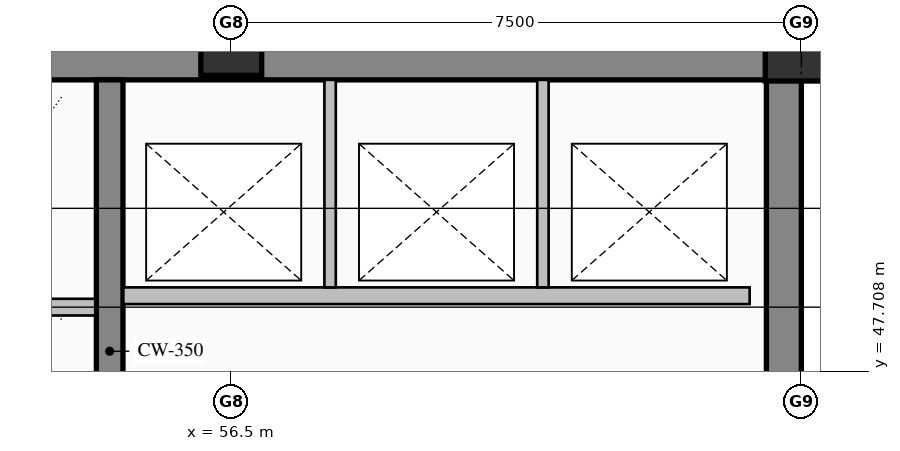
"""IFC4 building model, lengths in metres.
Left out: names, types, materials, properties, quantities, classifications, styles, units other than length and angle.
Written with IfcOpenShell. Run it as: python <this file> out.ifc"""

import sys

from ifc_helpers import new_model, si_unit, direction, frame, frame_2d, origin, origin_2d, place, context, subcontext, project, spatial, rectangle, hollow_rectangle, extrude, element, save


model = new_model("IFC4")
c1 = context("Model", 3, precision=1e-05, world=origin(), true_north=direction((0.0, 1.0)))
c2 = subcontext(c1, "Body", "Model", "MODEL_VIEW")
j1 = project(units=[si_unit("LENGTHUNIT", "METRE"), si_unit("PLANEANGLEUNIT", "RADIAN")], contexts=[c1])
p1 = place(None, origin())
s1 = spatial("IfcSite", under=j1, at=p1, CompositionType="ELEMENT")
p2 = place(p1, origin())
s2 = spatial("IfcBuilding", under=s1, at=p2, CompositionType="ELEMENT")
p3 = place(p2, frame((0.0, 0.0, 217.8)))
s3 = spatial("IfcBuildingStorey", under=s2, at=p3, CompositionType="ELEMENT", Elevation=217.8)
p4 = place(p3, frame((40.5, 51.77, 0.0), z_axis=(0.0, 0.0, 1.0), x_axis=(1.0, 0.0, 0.0)))
e1 = element("IfcWall", 1, at=p4, inside=s3, PredefinedType="SHEAR", context=c2, shape_type="SweptSolid", body=[
    extrude(rectangle(XDim=23.5, YDim=0.46, at=frame_2d((11.75, 0.0))), origin(), (0.0, 0.0, 1.0), 3.775),
])
p5 = place(p3, frame((63.77, 36.32, 0.0), z_axis=(0.0, 0.0, 1.0), x_axis=(0.0, 1.0, 0.0)))
e2 = element("IfcWall", 2, at=p5, inside=s3, PredefinedType="SHEAR", context=c2, shape_type="SweptSolid", body=[
    extrude(rectangle(XDim=15.22, YDim=0.46, at=frame_2d((7.61, 0.0))), origin(), (0.0, 0.0, 1.0), 3.775),
])
p6 = place(p3, frame((54.9, 44.4, 0.0), z_axis=(0.0, 0.0, 1.0), x_axis=(0.0, 1.0, 0.0)))
e3 = element("IfcWall", 3, at=p6, inside=s3, PredefinedType="SHEAR", context=c2, shape_type="SweptSolid", body=[
    extrude(rectangle(XDim=7.14, YDim=0.35, at=frame_2d((3.57, 0.0))), origin(), (0.0, 0.0, 1.0), 3.775),
])
p7 = place(p3, frame((56.5, 52.0, 0.0), z_axis=(0.0, 0.0, 1.0), x_axis=(1.0, 0.0, 0.0)))
e4 = element("IfcColumn", 4, at=p7, inside=s3, PredefinedType="COLUMN", context=c2, shape_type="SweptSolid", body=[
    extrude(hollow_rectangle(XDim=0.8, YDim=0.8, WallThickness=0.032, at=origin_2d()), origin(), (0.0, 0.0, 1.0), 4.0),
])
p8 = place(p3, frame((64.0, 52.0, 0.0), z_axis=(0.0, 0.0, 1.0), x_axis=(1.0, 0.0, 0.0)))
e5 = element("IfcColumn", 5, at=p8, inside=s3, PredefinedType="COLUMN", context=c2, shape_type="SweptSolid", body=[
    extrude(hollow_rectangle(XDim=0.95, YDim=0.95, WallThickness=0.036, at=origin_2d()), origin(), (0.0, 0.0, 1.0), 4.0),
])
p9 = place(p3, frame((54.71, 48.55, 0.0), z_axis=(0.0, 0.0, 1.0), x_axis=(-1.0, 0.0, 0.0)))
e6 = element("IfcWall", 6, at=p9, inside=s3, PredefinedType="PARTITIONING", context=c2, shape_type="SweptSolid", body=[
    extrude(rectangle(XDim=5.12, YDim=0.22, at=frame_2d((2.56, 0.0))), origin(), (0.0, 0.0, 1.0), 3.775),
])
p10 = place(p9, frame((3.735, 0.0, 0.0)))
e7 = element("IfcOpeningElement", 7, at=p10, cuts=e6, PredefinedType="OPENING", context=c2, shape_type="SweptSolid", body=[
    extrude(rectangle(XDim=1.15, YDim=2.2, at=frame_2d((0.575, 1.1))), frame((0.0, 0.12, 0.0), z_axis=(0.0, -1.0, 0.0), x_axis=(1.0, 0.0, 0.0)), (0.0, 0.0, 1.0), 0.24),
])
p11 = place(p9, frame((0.935, 0.0, 0.0)))
e8 = element("IfcOpeningElement", 8, at=p11, cuts=e6, PredefinedType="OPENING", context=c2, shape_type="SweptSolid", body=[
    extrude(rectangle(XDim=1.15, YDim=2.2, at=frame_2d((0.575, 1.1))), frame((0.0, 0.12, 0.0), z_axis=(0.0, -1.0, 0.0), x_axis=(1.0, 0.0, 0.0)), (0.0, 0.0, 1.0), 0.24),
])
p12 = place(p3, frame((63.32, 48.7, 0.0), z_axis=(0.0, 0.0, 1.0), x_axis=(-1.0, 0.0, 0.0)))
e9 = element("IfcWall", 9, at=p12, inside=s3, PredefinedType="PARTITIONING", context=c2, shape_type="SweptSolid", body=[
    extrude(rectangle(XDim=8.24, YDim=0.22, at=frame_2d((4.12, 0.0))), origin(), (0.0, 0.0, 1.0), 3.775),
])
for number, where, z_axis, x_axis in (
    (10, (57.8, 48.81, 0.0), (0.0, 0.0, 1.0), (0.0, 1.0, 0.0)),
    (11, (60.6, 48.81, 0.0), (0.0, 0.0, 1.0), (0.0, 1.0, 0.0)),
):
    element("IfcWall", number, at=place(p3, frame(where, z_axis=z_axis, x_axis=x_axis)), inside=s3, PredefinedType="PARTITIONING", context=c2, shape_type="SweptSolid", body=[
        extrude(rectangle(XDim=2.73, YDim=0.15, at=frame_2d((1.365, 0.0))), origin(), (0.0, 0.0, 1.0), 3.775),
    ])
save(model, sys.argv[1])
